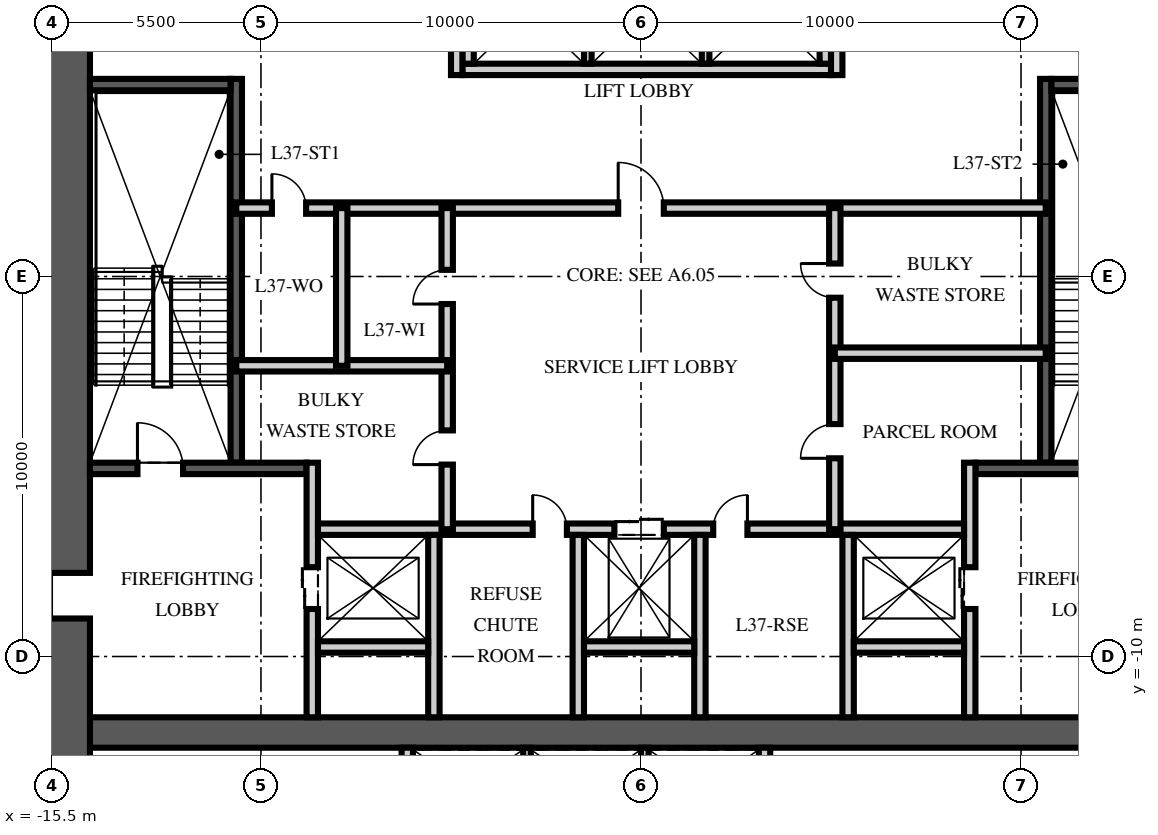
"""IFC4 building model, lengths in metres.
Left out: names, types, materials, properties, quantities, classifications, styles, units other than length and angle.
Written with IfcOpenShell. Run it as: python <this file> out.ifc"""

import sys

from ifc_helpers import new_model, si_unit, direction, frame, frame_2d, origin, place, context, subcontext, project, spatial, rectangle, extrude, element, fill, save


model = new_model("IFC4")
c1 = context("Model", 3, precision=1e-05, world=origin(), true_north=direction((0.0, 1.0)))
c2 = subcontext(c1, "Body", "Model", "MODEL_VIEW")
j1 = project(units=[si_unit("LENGTHUNIT", "METRE"), si_unit("PLANEANGLEUNIT", "RADIAN")], contexts=[c1])
p1 = place(None, origin())
s1 = spatial("IfcSite", under=j1, at=p1, CompositionType="ELEMENT")
p2 = place(p1, origin())
s2 = spatial("IfcBuilding", under=s1, at=p2, CompositionType="ELEMENT")
p3 = place(p2, frame((0.0, 0.0, 148.5)))
s3 = spatial("IfcBuildingStorey", under=s2, at=p3, CompositionType="ELEMENT", Elevation=148.5)
p4 = place(p3, frame((-15.5, -12.0, -0.25), z_axis=(0.0, 0.0, 1.0), x_axis=(1.0, 0.0, 0.0)))
e1 = element("IfcWall", 1, at=p4, inside=s3, PredefinedType="SHEAR", context=c2, shape_type="SweptSolid", body=[
    extrude(rectangle(XDim=31.0, YDim=0.8, at=frame_2d((15.5, 0.0))), origin(), (0.0, 0.0, 1.0), 3.75),
])
p5 = place(p3, frame((-15.5, -15.5, -0.25), z_axis=(0.0, 0.0, 1.0), x_axis=(0.0, 1.0, 0.0)))
e2 = element("IfcWall", 2, at=p5, inside=s3, PredefinedType="SHEAR", context=c2, shape_type="SweptSolid", body=[
    extrude(rectangle(XDim=31.0, YDim=2.0, at=frame_2d((15.5, 0.0))), origin(), (0.0, 0.0, 1.0), 3.75),
])
p6 = place(p5, frame((6.5, 0.0, 0.25)))
e3 = element("IfcOpeningElement", 3, at=p6, cuts=e2, PredefinedType="OPENING", context=c2, shape_type="SweptSolid", body=[
    extrude(rectangle(XDim=1.2, YDim=2.1, at=frame_2d((0.6, 1.05))), frame((0.0, 1.01, 0.0), z_axis=(0.0, -1.0, 0.0), x_axis=(1.0, 0.0, 0.0)), (0.0, 0.0, 1.0), 2.02),
])
p7 = place(p5, frame((23.0, 0.0, 0.25)))
e4 = element("IfcOpeningElement", 4, at=p7, cuts=e2, PredefinedType="OPENING", context=c2, shape_type="SweptSolid", body=[
    extrude(rectangle(XDim=1.8, YDim=2.1, at=frame_2d((0.9, 1.05))), frame((0.0, 1.01, 0.0), z_axis=(0.0, -1.0, 0.0), x_axis=(1.0, 0.0, 0.0)), (0.0, 0.0, 1.0), 2.02),
])
p8 = place(p3, frame((-10.65, -4.9, 0.0), z_axis=(0.0, 0.0, 1.0), x_axis=(0.0, 1.0, 0.0)))
e5 = element("IfcWall", 5, at=p8, inside=s3, PredefinedType="SOLIDWALL", context=c2, shape_type="SweptSolid", body=[
    extrude(rectangle(XDim=10.1, YDim=0.3, at=frame_2d((5.05, 0.0))), origin(), (0.0, 0.0, 1.0), 3.5),
])
p9 = place(p3, frame((-14.5, -5.05, 0.0), z_axis=(0.0, 0.0, 1.0), x_axis=(1.0, 0.0, 0.0)))
e6 = element("IfcWall", 6, at=p9, inside=s3, PredefinedType="SOLIDWALL", context=c2, shape_type="SweptSolid", body=[
    extrude(rectangle(XDim=5.7, YDim=0.3, at=frame_2d((2.85, 0.0))), origin(), (0.0, 0.0, 1.0), 3.5),
])
p10 = place(p9, frame((1.25, 0.0, 0.0)))
e7 = element("IfcOpeningElement", 7, at=p10, cuts=e6, PredefinedType="OPENING", context=c2, shape_type="SweptSolid", body=[
    extrude(rectangle(XDim=1.2, YDim=2.1, at=frame_2d((0.6, 1.05))), frame((0.0, 0.16, 0.0), z_axis=(0.0, -1.0, 0.0), x_axis=(1.0, 0.0, 0.0)), (0.0, 0.0, 1.0), 0.32),
])
p11 = place(p3, frame((-14.5, 5.05, 0.0), z_axis=(0.0, 0.0, 1.0), x_axis=(1.0, 0.0, 0.0)))
e8 = element("IfcWall", 8, at=p11, inside=s3, PredefinedType="SOLIDWALL", context=c2, shape_type="SweptSolid", body=[
    extrude(rectangle(XDim=3.7, YDim=0.3, at=frame_2d((1.85, 0.0))), origin(), (0.0, 0.0, 1.0), 3.5),
])
p12 = place(p3, frame((-8.65, -11.6, 0.0), z_axis=(0.0, 0.0, 1.0), x_axis=(0.0, 1.0, 0.0)))
e9 = element("IfcWall", 9, at=p12, inside=s3, PredefinedType="PARTITIONING", context=c2, shape_type="SweptSolid", body=[
    extrude(rectangle(XDim=6.7, YDim=0.3, at=frame_2d((3.35, 0.0))), origin(), (0.0, 0.0, 1.0), 3.5),
])
p13 = place(p12, frame((2.85, 0.0, 0.0)))
e10 = element("IfcOpeningElement", 10, at=p13, cuts=e9, PredefinedType="OPENING", context=c2, shape_type="SweptSolid", body=[
    extrude(rectangle(XDim=1.1, YDim=2.1, at=frame_2d((0.55, 1.05))), frame((0.0, 0.16, 0.0), z_axis=(0.0, -1.0, 0.0), x_axis=(1.0, 0.0, 0.0)), (0.0, 0.0, 1.0), 0.32),
])
p14 = place(p3, frame((10.65, -4.9, 0.0), z_axis=(0.0, 0.0, 1.0), x_axis=(0.0, 1.0, 0.0)))
e11 = element("IfcWall", 11, at=p14, inside=s3, PredefinedType="SOLIDWALL", context=c2, shape_type="SweptSolid", body=[
    extrude(rectangle(XDim=10.1, YDim=0.3, at=frame_2d((5.05, 0.0))), origin(), (0.0, 0.0, 1.0), 3.5),
])
p15 = place(p3, frame((14.5, -5.05, 0.0), z_axis=(0.0, 0.0, 1.0), x_axis=(-1.0, 0.0, 0.0)))
e12 = element("IfcWall", 12, at=p15, inside=s3, PredefinedType="SOLIDWALL", context=c2, shape_type="SweptSolid", body=[
    extrude(rectangle(XDim=5.7, YDim=0.3, at=frame_2d((2.85, 0.0))), origin(), (0.0, 0.0, 1.0), 3.5),
])
p16 = place(p15, frame((1.25, 0.0, 0.0)))
e13 = element("IfcOpeningElement", 13, at=p16, cuts=e12, PredefinedType="OPENING", context=c2, shape_type="SweptSolid", body=[
    extrude(rectangle(XDim=1.2, YDim=2.1, at=frame_2d((0.6, 1.05))), frame((0.0, 0.16, 0.0), z_axis=(0.0, -1.0, 0.0), x_axis=(1.0, 0.0, 0.0)), (0.0, 0.0, 1.0), 0.32),
])
p17 = place(p3, frame((14.5, 5.05, 0.0), z_axis=(0.0, 0.0, 1.0), x_axis=(-1.0, 0.0, 0.0)))
e14 = element("IfcWall", 14, at=p17, inside=s3, PredefinedType="SOLIDWALL", context=c2, shape_type="SweptSolid", body=[
    extrude(rectangle(XDim=3.7, YDim=0.3, at=frame_2d((1.85, 0.0))), origin(), (0.0, 0.0, 1.0), 3.5),
])
p18 = place(p3, frame((8.65, -11.6, 0.0), z_axis=(0.0, 0.0, 1.0), x_axis=(0.0, 1.0, 0.0)))
e15 = element("IfcWall", 15, at=p18, inside=s3, PredefinedType="PARTITIONING", context=c2, shape_type="SweptSolid", body=[
    extrude(rectangle(XDim=6.7, YDim=0.3, at=frame_2d((3.35, 0.0))), origin(), (0.0, 0.0, 1.0), 3.5),
])
p19 = place(p18, frame((2.85, 0.0, 0.0)))
e16 = element("IfcOpeningElement", 16, at=p19, cuts=e15, PredefinedType="OPENING", context=c2, shape_type="SweptSolid", body=[
    extrude(rectangle(XDim=1.1, YDim=2.1, at=frame_2d((0.55, 1.05))), frame((0.0, 0.16, 0.0), z_axis=(0.0, -1.0, 0.0), x_axis=(1.0, 0.0, 0.0)), (0.0, 0.0, 1.0), 0.32),
])
p20 = place(p3, frame((-8.5, -6.65, 0.0), z_axis=(0.0, 0.0, 1.0), x_axis=(1.0, 0.0, 0.0)))
e17 = element("IfcWall", 17, at=p20, inside=s3, PredefinedType="PARTITIONING", context=c2, shape_type="SweptSolid", body=[
    extrude(rectangle(XDim=17.0, YDim=0.3, at=frame_2d((8.5, 0.0))), origin(), (0.0, 0.0, 1.0), 3.5),
])
p21 = place(p20, frame((7.8, 0.0, 0.0)))
e18 = element("IfcOpeningElement", 18, at=p21, cuts=e17, PredefinedType="OPENING", context=c2, shape_type="SweptSolid", body=[
    extrude(rectangle(XDim=1.3, YDim=2.4, at=frame_2d((0.65, 1.2))), frame((0.0, 0.16, 0.0), z_axis=(0.0, -1.0, 0.0), x_axis=(1.0, 0.0, 0.0)), (0.0, 0.0, 1.0), 0.32),
])
p22 = place(p20, frame((5.65, 0.0, 0.0)))
e19 = element("IfcOpeningElement", 19, at=p22, cuts=e17, PredefinedType="OPENING", context=c2, shape_type="SweptSolid", body=[
    extrude(rectangle(XDim=0.9, YDim=2.1, at=frame_2d((0.45, 1.05))), frame((0.0, 0.16, 0.0), z_axis=(0.0, -1.0, 0.0), x_axis=(1.0, 0.0, 0.0)), (0.0, 0.0, 1.0), 0.32),
])
p23 = place(p20, frame((10.4, 0.0, 0.0)))
e20 = element("IfcOpeningElement", 20, at=p23, cuts=e17, PredefinedType="OPENING", context=c2, shape_type="SweptSolid", body=[
    extrude(rectangle(XDim=0.9, YDim=2.1, at=frame_2d((0.45, 1.05))), frame((0.0, 0.16, 0.0), z_axis=(0.0, -1.0, 0.0), x_axis=(1.0, 0.0, 0.0)), (0.0, 0.0, 1.0), 0.32),
])
for number, where, z_axis, x_axis in (
    (21, (-5.45, -11.6, 0.0), (0.0, 0.0, 1.0), (0.0, 1.0, 0.0)),
    (22, (-1.65, -11.6, 0.0), (0.0, 0.0, 1.0), (0.0, 1.0, 0.0)),
    (23, (1.55, -11.6, 0.0), (0.0, 0.0, 1.0), (0.0, 1.0, 0.0)),
    (24, (5.45, -11.6, 0.0), (0.0, 0.0, 1.0), (0.0, 1.0, 0.0)),
):
    element("IfcWall", number, at=place(p3, frame(where, z_axis=z_axis, x_axis=x_axis)), inside=s3, PredefinedType="PARTITIONING", context=c2, shape_type="SweptSolid", body=[
        extrude(rectangle(XDim=4.8, YDim=0.3, at=frame_2d((2.4, 0.0))), origin(), (0.0, 0.0, 1.0), 3.5),
    ])
for number, where, z_axis, x_axis in (
    (25, (-8.5, -9.75, 0.0), (0.0, 0.0, 1.0), (1.0, 0.0, 0.0)),
    (26, (-1.5, -9.75, 0.0), (0.0, 0.0, 1.0), (1.0, 0.0, 0.0)),
    (27, (5.6, -9.75, 0.0), (0.0, 0.0, 1.0), (1.0, 0.0, 0.0)),
):
    element("IfcWall", number, at=place(p3, frame(where, z_axis=z_axis, x_axis=x_axis)), inside=s3, PredefinedType="PARTITIONING", context=c2, shape_type="SweptSolid", body=[
        extrude(rectangle(XDim=2.9, YDim=0.3, at=frame_2d((1.45, 0.0))), origin(), (0.0, 0.0, 1.0), 3.5),
    ])
p24 = place(p3, frame((-4.7, 5.45, 0.0), z_axis=(0.0, 0.0, 1.0), x_axis=(1.0, 0.0, 0.0)))
e28 = element("IfcWall", 28, at=p24, inside=s3, PredefinedType="PARTITIONING", context=c2, shape_type="SweptSolid", body=[
    extrude(rectangle(XDim=9.7, YDim=0.3, at=frame_2d((4.85, 0.0))), origin(), (0.0, 0.0, 1.0), 3.5),
])
for number, where, z_axis, x_axis in (
    (29, (-4.55, 5.6, 0.0), (0.0, 0.0, 1.0), (0.0, 1.0, 0.0)),
    (30, (4.85, 5.6, 0.0), (0.0, 0.0, 1.0), (0.0, 1.0, 0.0)),
):
    element("IfcWall", number, at=place(p3, frame(where, z_axis=z_axis, x_axis=x_axis)), inside=s3, PredefinedType="PARTITIONING", context=c2, shape_type="SweptSolid", body=[
        extrude(rectangle(XDim=2.8, YDim=0.3, at=frame_2d((1.4, 0.0))), origin(), (0.0, 0.0, 1.0), 3.5),
    ])
for number, where, z_axis, x_axis in (
    (31, (-1.4, 5.6, 0.0), (0.0, 0.0, 1.0), (0.0, 1.0, 0.0)),
    (32, (1.7, 5.6, 0.0), (0.0, 0.0, 1.0), (0.0, 1.0, 0.0)),
):
    element("IfcWall", number, at=place(p3, frame(where, z_axis=z_axis, x_axis=x_axis)), inside=s3, PredefinedType="PARTITIONING", context=c2, shape_type="SweptSolid", body=[
        extrude(rectangle(XDim=2.8, YDim=0.2, at=frame_2d((1.4, 0.0))), origin(), (0.0, 0.0, 1.0), 3.5),
    ])
for number, where, z_axis, x_axis in (
    (33, (-6.15, -14.5, 0.0), (0.0, 0.0, 1.0), (0.0, 1.0, 0.0)),
    (34, (3.25, -14.5, 0.0), (0.0, 0.0, 1.0), (0.0, 1.0, 0.0)),
):
    element("IfcWall", number, at=place(p3, frame(where, z_axis=z_axis, x_axis=x_axis)), inside=s3, PredefinedType="PARTITIONING", context=c2, shape_type="SweptSolid", body=[
        extrude(rectangle(XDim=2.1, YDim=0.3, at=frame_2d((1.05, 0.0))), origin(), (0.0, 0.0, 1.0), 3.5),
    ])
for number, where, z_axis, x_axis in (
    (35, (-3.0, -14.5, 0.0), (0.0, 0.0, 1.0), (0.0, 1.0, 0.0)),
    (36, (0.1, -14.5, 0.0), (0.0, 0.0, 1.0), (0.0, 1.0, 0.0)),
):
    element("IfcWall", number, at=place(p3, frame(where, z_axis=z_axis, x_axis=x_axis)), inside=s3, PredefinedType="PARTITIONING", context=c2, shape_type="SweptSolid", body=[
        extrude(rectangle(XDim=2.1, YDim=0.2, at=frame_2d((1.05, 0.0))), origin(), (0.0, 0.0, 1.0), 3.5),
    ])
p25 = place(p3, frame((-10.65, 1.8, 0.0), z_axis=(0.0, 0.0, 1.0), x_axis=(1.0, 0.0, 0.0)))
e37 = element("IfcWall", 37, at=p25, inside=s3, PredefinedType="PARTITIONING", context=c2, shape_type="SweptSolid", body=[
    extrude(rectangle(XDim=21.3, YDim=0.3, at=frame_2d((10.65, 0.0))), origin(), (0.0, 0.0, 1.0), 3.5),
])
p26 = place(p25, frame((10.05, 0.0, 0.0)))
e38 = element("IfcOpeningElement", 38, at=p26, cuts=e37, PredefinedType="OPENING", context=c2, shape_type="SweptSolid", body=[
    extrude(rectangle(XDim=1.2, YDim=2.1, at=frame_2d((0.6, 1.05))), frame((0.0, 0.16, 0.0), z_axis=(0.0, -1.0, 0.0), x_axis=(1.0, 0.0, 0.0)), (0.0, 0.0, 1.0), 0.32),
])
p27 = place(p25, frame((0.938, 0.0, 0.0)))
e39 = element("IfcOpeningElement", 39, at=p27, cuts=e37, PredefinedType="OPENING", context=c2, shape_type="SweptSolid", body=[
    extrude(rectangle(XDim=0.9, YDim=2.1, at=frame_2d((0.45, 1.05))), frame((0.0, 0.16, 0.0), z_axis=(0.0, -1.0, 0.0), x_axis=(1.0, 0.0, 0.0)), (0.0, 0.0, 1.0), 0.32),
])
p28 = place(p3, frame((-5.1, -6.65, 0.0), z_axis=(0.0, 0.0, 1.0), x_axis=(0.0, 1.0, 0.0)))
e40 = element("IfcWall", 40, at=p28, inside=s3, PredefinedType="PARTITIONING", context=c2, shape_type="SweptSolid", body=[
    extrude(rectangle(XDim=8.45, YDim=0.3, at=frame_2d((4.225, 0.0))), origin(), (0.0, 0.0, 1.0), 3.5),
])
p29 = place(p28, frame((1.7, 0.0, 0.0)))
e41 = element("IfcOpeningElement", 41, at=p29, cuts=e40, PredefinedType="OPENING", context=c2, shape_type="SweptSolid", body=[
    extrude(rectangle(XDim=0.9, YDim=2.1, at=frame_2d((0.45, 1.05))), frame((0.0, 0.16, 0.0), z_axis=(0.0, -1.0, 0.0), x_axis=(1.0, 0.0, 0.0)), (0.0, 0.0, 1.0), 0.32),
])
p30 = place(p28, frame((5.925, 0.0, 0.0)))
e42 = element("IfcOpeningElement", 42, at=p30, cuts=e40, PredefinedType="OPENING", context=c2, shape_type="SweptSolid", body=[
    extrude(rectangle(XDim=0.9, YDim=2.1, at=frame_2d((0.45, 1.05))), frame((0.0, 0.16, 0.0), z_axis=(0.0, -1.0, 0.0), x_axis=(1.0, 0.0, 0.0)), (0.0, 0.0, 1.0), 0.32),
])
p31 = place(p3, frame((5.1, -6.65, 0.0), z_axis=(0.0, 0.0, 1.0), x_axis=(0.0, 1.0, 0.0)))
e43 = element("IfcWall", 43, at=p31, inside=s3, PredefinedType="PARTITIONING", context=c2, shape_type="SweptSolid", body=[
    extrude(rectangle(XDim=8.45, YDim=0.3, at=frame_2d((4.225, 0.0))), origin(), (0.0, 0.0, 1.0), 3.5),
])
p32 = place(p31, frame((1.866, 0.0, 0.0)))
e44 = element("IfcOpeningElement", 44, at=p32, cuts=e43, PredefinedType="OPENING", context=c2, shape_type="SweptSolid", body=[
    extrude(rectangle(XDim=0.9, YDim=2.1, at=frame_2d((0.45, 1.05))), frame((0.0, 0.16, 0.0), z_axis=(0.0, -1.0, 0.0), x_axis=(1.0, 0.0, 0.0)), (0.0, 0.0, 1.0), 0.32),
])
p33 = place(p31, frame((6.091, 0.0, 0.0)))
e45 = element("IfcOpeningElement", 45, at=p33, cuts=e43, PredefinedType="OPENING", context=c2, shape_type="SweptSolid", body=[
    extrude(rectangle(XDim=0.9, YDim=2.1, at=frame_2d((0.45, 1.05))), frame((0.0, 0.16, 0.0), z_axis=(0.0, -1.0, 0.0), x_axis=(1.0, 0.0, 0.0)), (0.0, 0.0, 1.0), 0.32),
])
p34 = place(p3, frame((-10.65, -2.35, 0.0), z_axis=(0.0, 0.0, 1.0), x_axis=(1.0, 0.0, 0.0)))
e46 = element("IfcWall", 46, at=p34, inside=s3, PredefinedType="PARTITIONING", context=c2, shape_type="SweptSolid", body=[
    extrude(rectangle(XDim=5.55, YDim=0.3, at=frame_2d((2.775, 0.0))), origin(), (0.0, 0.0, 1.0), 3.5),
])
p35 = place(p3, frame((-7.875, -2.35, 0.0), z_axis=(0.0, 0.0, 1.0), x_axis=(0.0, 1.0, 0.0)))
e47 = element("IfcWall", 47, at=p35, inside=s3, PredefinedType="PARTITIONING", context=c2, shape_type="SweptSolid", body=[
    extrude(rectangle(XDim=4.15, YDim=0.3, at=frame_2d((2.075, 0.0))), origin(), (0.0, 0.0, 1.0), 3.5),
])
p36 = place(p3, frame((10.65, -2.018, 0.0), z_axis=(0.0, 0.0, 1.0), x_axis=(-1.0, 0.0, 0.0)))
e48 = element("IfcWall", 48, at=p36, inside=s3, PredefinedType="PARTITIONING", context=c2, shape_type="SweptSolid", body=[
    extrude(rectangle(XDim=5.55, YDim=0.3, at=frame_2d((2.775, 0.0))), origin(), (0.0, 0.0, 1.0), 3.5),
])
p37 = place(p3, frame((-4.85, 5.3, 0.0), z_axis=(0.0, 0.0, 1.0), x_axis=(0.0, 1.0, 0.0)))
e49 = element("IfcWall", 49, at=p37, inside=s3, PredefinedType="PARTITIONING", context=c2, shape_type="SweptSolid", body=[
    extrude(rectangle(XDim=6.3, YDim=0.3, at=frame_2d((3.15, 0.0))), origin(), (0.0, 0.0, 1.0), 3.5),
])
p38 = place(p3, frame((5.15, 5.3, 0.0), z_axis=(0.0, 0.0, 1.0), x_axis=(0.0, 1.0, 0.0)))
e50 = element("IfcWall", 50, at=p38, inside=s3, PredefinedType="PARTITIONING", context=c2, shape_type="SweptSolid", body=[
    extrude(rectangle(XDim=6.3, YDim=0.3, at=frame_2d((3.15, 0.0))), origin(), (0.0, 0.0, 1.0), 3.5),
])
p39 = place(p38, frame((4.35, 0.0, 0.0)))
e51 = element("IfcOpeningElement", 51, at=p39, cuts=e50, PredefinedType="OPENING", context=c2, shape_type="SweptSolid", body=[
    extrude(rectangle(XDim=0.9, YDim=2.1, at=frame_2d((0.45, 1.05))), frame((0.0, 0.16, 0.0), z_axis=(0.0, -1.0, 0.0), x_axis=(1.0, 0.0, 0.0)), (0.0, 0.0, 1.0), 0.32),
])
p40 = place(p10, origin())
e52 = element("IfcDoor", 52, at=p40, inside=s3, OperationType="SINGLE_SWING_LEFT", PredefinedType="DOOR", context=c2, shape_type="SweptSolid", body=[
    extrude(rectangle(XDim=1.2, YDim=2.1, at=frame_2d((0.6, 1.05))), frame((0.0, 0.025, 0.0), z_axis=(0.0, -1.0, 0.0), x_axis=(1.0, 0.0, 0.0)), (0.0, 0.0, 1.0), 0.05),
])
fill(e7, e52)
p41 = place(p6, origin())
e53 = element("IfcDoor", 53, at=p41, inside=s3, OperationType="SINGLE_SWING_LEFT", PredefinedType="DOOR", context=c2, shape_type="SweptSolid", body=[
    extrude(rectangle(XDim=1.2, YDim=2.1, at=frame_2d((0.6, 1.05))), frame((0.0, 0.025, 0.0), z_axis=(0.0, -1.0, 0.0), x_axis=(1.0, 0.0, 0.0)), (0.0, 0.0, 1.0), 0.05),
])
fill(e3, e53)
p42 = place(p13, origin())
e54 = element("IfcDoor", 54, at=p42, inside=s3, OperationType="DOUBLE_DOOR_SLIDING", PredefinedType="DOOR", context=c2, shape_type="SweptSolid", body=[
    extrude(rectangle(XDim=1.1, YDim=2.1, at=frame_2d((0.55, 1.05))), frame((0.0, 0.025, 0.0), z_axis=(0.0, -1.0, 0.0), x_axis=(1.0, 0.0, 0.0)), (0.0, 0.0, 1.0), 0.05),
])
fill(e10, e54)
p43 = place(p19, origin())
e55 = element("IfcDoor", 55, at=p43, inside=s3, OperationType="DOUBLE_DOOR_SLIDING", PredefinedType="DOOR", context=c2, shape_type="SweptSolid", body=[
    extrude(rectangle(XDim=1.1, YDim=2.1, at=frame_2d((0.55, 1.05))), frame((0.0, 0.025, 0.0), z_axis=(0.0, -1.0, 0.0), x_axis=(1.0, 0.0, 0.0)), (0.0, 0.0, 1.0), 0.05),
])
fill(e16, e55)
p44 = place(p21, origin())
e56 = element("IfcDoor", 56, at=p44, inside=s3, OperationType="DOUBLE_DOOR_SLIDING", PredefinedType="DOOR", context=c2, shape_type="SweptSolid", body=[
    extrude(rectangle(XDim=1.3, YDim=2.4, at=frame_2d((0.65, 1.2))), frame((0.0, 0.025, 0.0), z_axis=(0.0, -1.0, 0.0), x_axis=(1.0, 0.0, 0.0)), (0.0, 0.0, 1.0), 0.05),
])
fill(e18, e56)
p45 = place(p26, origin())
e57 = element("IfcDoor", 57, at=p45, inside=s3, OperationType="SINGLE_SWING_LEFT", PredefinedType="DOOR", context=c2, shape_type="SweptSolid", body=[
    extrude(rectangle(XDim=1.2, YDim=2.1, at=frame_2d((0.6, 1.05))), frame((0.0, 0.025, 0.0), z_axis=(0.0, -1.0, 0.0), x_axis=(1.0, 0.0, 0.0)), (0.0, 0.0, 1.0), 0.05),
])
fill(e38, e57)
p46 = place(p22, origin())
e58 = element("IfcDoor", 58, at=p46, inside=s3, OperationType="SINGLE_SWING_LEFT", PredefinedType="DOOR", context=c2, shape_type="SweptSolid", body=[
    extrude(rectangle(XDim=0.9, YDim=2.1, at=frame_2d((0.45, 1.05))), frame((0.0, 0.025, 0.0), z_axis=(0.0, -1.0, 0.0), x_axis=(1.0, 0.0, 0.0)), (0.0, 0.0, 1.0), 0.05),
])
fill(e19, e58)
p47 = place(p23, origin())
e59 = element("IfcDoor", 59, at=p47, inside=s3, OperationType="SINGLE_SWING_RIGHT", PredefinedType="DOOR", context=c2, shape_type="SweptSolid", body=[
    extrude(rectangle(XDim=0.9, YDim=2.1, at=frame_2d((0.45, 1.05))), frame((0.0, 0.025, 0.0), z_axis=(0.0, -1.0, 0.0), x_axis=(1.0, 0.0, 0.0)), (0.0, 0.0, 1.0), 0.05),
])
fill(e20, e59)
p48 = place(p29, origin())
e60 = element("IfcDoor", 60, at=p48, inside=s3, OperationType="SINGLE_SWING_LEFT", PredefinedType="DOOR", context=c2, shape_type="SweptSolid", body=[
    extrude(rectangle(XDim=0.9, YDim=2.1, at=frame_2d((0.45, 1.05))), frame((0.0, 0.025, 0.0), z_axis=(0.0, -1.0, 0.0), x_axis=(1.0, 0.0, 0.0)), (0.0, 0.0, 1.0), 0.05),
])
fill(e41, e60)
p49 = place(p30, origin())
e61 = element("IfcDoor", 61, at=p49, inside=s3, OperationType="SINGLE_SWING_LEFT", PredefinedType="DOOR", context=c2, shape_type="SweptSolid", body=[
    extrude(rectangle(XDim=0.9, YDim=2.1, at=frame_2d((0.45, 1.05))), frame((0.0, 0.025, 0.0), z_axis=(0.0, -1.0, 0.0), x_axis=(1.0, 0.0, 0.0)), (0.0, 0.0, 1.0), 0.05),
])
fill(e42, e61)
p50 = place(p27, origin())
e62 = element("IfcDoor", 62, at=p50, inside=s3, OperationType="SINGLE_SWING_LEFT", PredefinedType="DOOR", context=c2, shape_type="SweptSolid", body=[
    extrude(rectangle(XDim=0.9, YDim=2.1, at=frame_2d((0.45, 1.05))), frame((0.0, 0.025, 0.0), z_axis=(0.0, -1.0, 0.0), x_axis=(1.0, 0.0, 0.0)), (0.0, 0.0, 1.0), 0.05),
])
fill(e39, e62)
p51 = place(p32, origin())
e63 = element("IfcDoor", 63, at=p51, inside=s3, OperationType="SINGLE_SWING_LEFT", PredefinedType="DOOR", context=c2, shape_type="SweptSolid", body=[
    extrude(rectangle(XDim=0.9, YDim=2.1, at=frame_2d((0.45, 1.05))), frame((0.0, 0.025, 0.0), z_axis=(0.0, -1.0, 0.0), x_axis=(1.0, 0.0, 0.0)), (0.0, 0.0, 1.0), 0.05),
])
fill(e44, e63)
p52 = place(p33, origin())
e64 = element("IfcDoor", 64, at=p52, inside=s3, OperationType="SINGLE_SWING_RIGHT", PredefinedType="DOOR", context=c2, shape_type="SweptSolid", body=[
    extrude(rectangle(XDim=0.9, YDim=2.1, at=frame_2d((0.45, 1.05))), frame((0.0, 0.025, 0.0), z_axis=(0.0, -1.0, 0.0), x_axis=(1.0, 0.0, 0.0)), (0.0, 0.0, 1.0), 0.05),
])
fill(e45, e64)
save(model, sys.argv[1])
